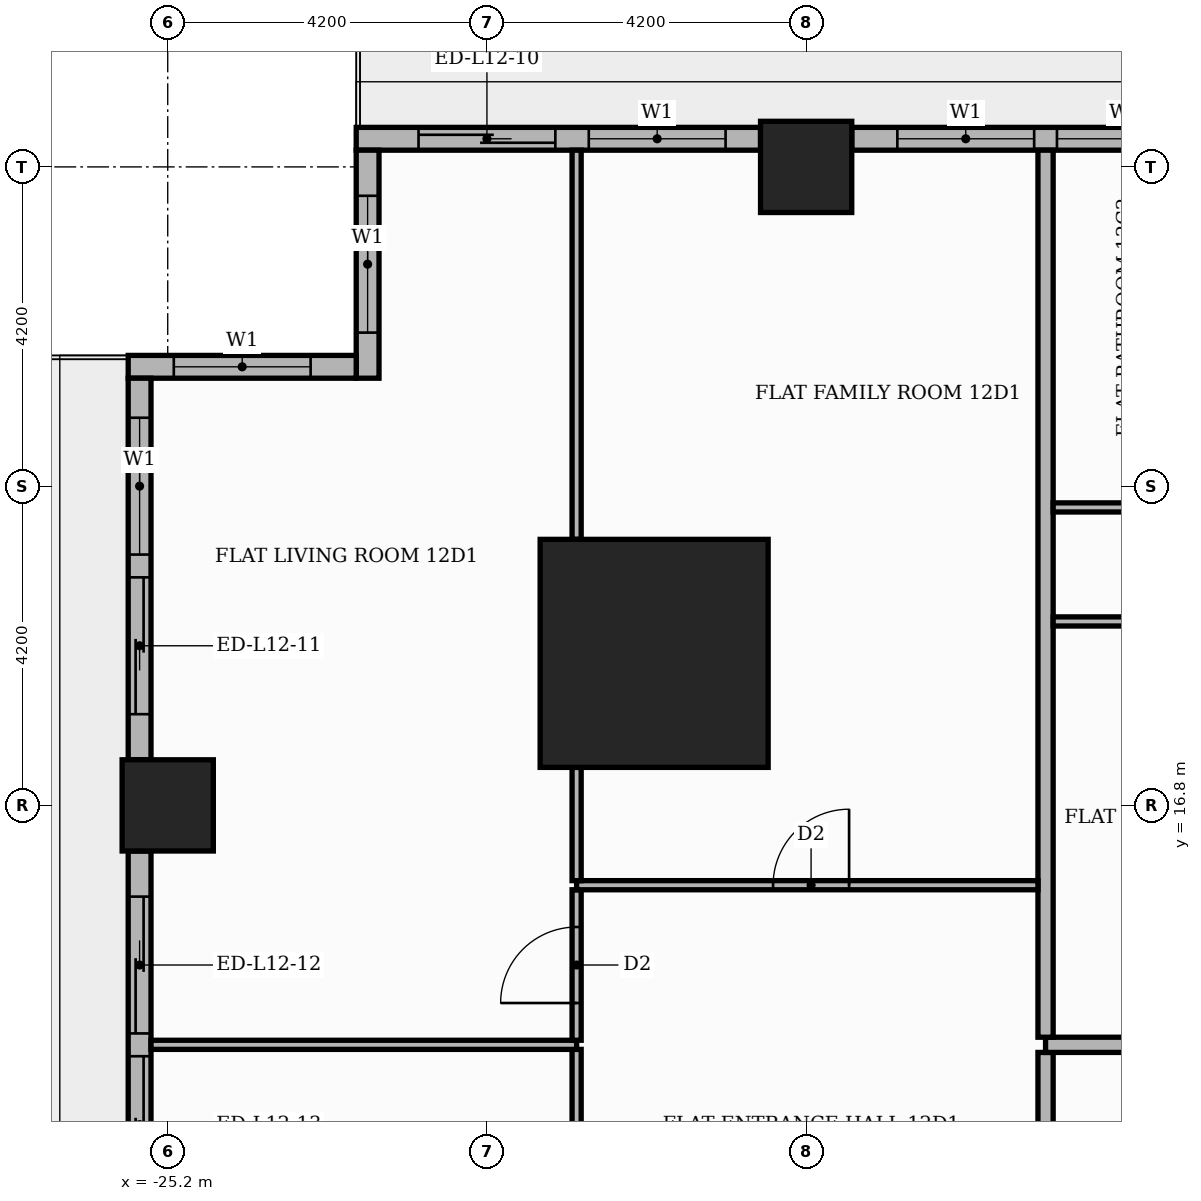
"""IFC4 building model, lengths in metres.
Left out: names, types, materials, properties, quantities, classifications, styles, units other than length and angle.
Written with IfcOpenShell. Run it as: python <this file> out.ifc"""

import sys

from ifc_helpers import new_model, si_unit, direction, frame, frame_2d, origin, origin_2d, place, context, subcontext, project, spatial, rectangle, extrude, element, fill, save


model = new_model("IFC4")
c1 = context("Model", 3, precision=1e-05, world=origin(), true_north=direction((0.0, 1.0)))
c2 = subcontext(c1, "Body", "Model", "MODEL_VIEW")
j1 = project(units=[si_unit("LENGTHUNIT", "METRE"), si_unit("PLANEANGLEUNIT", "RADIAN")], contexts=[c1])
p1 = place(None, origin())
s1 = spatial("IfcSite", under=j1, at=p1, CompositionType="ELEMENT")
p2 = place(p1, origin())
s2 = spatial("IfcBuilding", under=s1, at=p2, CompositionType="ELEMENT")
p3 = place(p2, frame((0.0, 0.0, 54.3)))
s3 = spatial("IfcBuildingStorey", under=s2, at=p3, CompositionType="ELEMENT", Elevation=54.3)
p4 = place(p3, frame((-18.8, 18.8, 0.0), z_axis=(0.0, 0.0, 1.0), x_axis=(1.0, 0.0, 0.0)))
e1 = element("IfcColumn", 1, at=p4, inside=s3, PredefinedType="COLUMN", context=c2, shape_type="SweptSolid", body=[
    extrude(rectangle(XDim=3.0, YDim=3.0, at=origin_2d()), origin(), (0.0, 0.0, 1.0), 3.9),
])
for number, where, z_axis, x_axis in (
    (2, (-16.8, 25.2, 0.0), (0.0, 0.0, 1.0), (1.0, 0.0, 0.0)),
    (3, (-25.2, 16.8, 0.0), (0.0, 0.0, 1.0), (1.0, 0.0, 0.0)),
):
    element("IfcColumn", number, at=place(p3, frame(where, z_axis=z_axis, x_axis=x_axis)), inside=s3, PredefinedType="COLUMN", context=c2, shape_type="SweptSolid", body=[
        extrude(rectangle(XDim=1.2, YDim=1.2, at=origin_2d()), origin(), (0.0, 0.0, 1.0), 3.9),
    ])
p5 = place(p3, frame((-9.0, 25.57, 0.0), z_axis=(0.0, 0.0, 1.0), x_axis=(-1.0, 0.0, 0.0)))
e4 = element("IfcWall", 4, at=p5, inside=s3, PredefinedType="STANDARD", context=c2, shape_type="SweptSolid", body=[
    extrude(rectangle(XDim=7.2, YDim=0.3, at=frame_2d((3.6, 0.0))), origin(), (0.0, 0.0, 1.0), 3.48),
])
p6 = place(p5, frame((0.6, 0.0, 0.9)))
e5 = element("IfcOpeningElement", 5, at=p6, cuts=e4, PredefinedType="OPENING", context=c2, shape_type="SweptSolid", body=[
    extrude(rectangle(XDim=1.8, YDim=2.1, at=frame_2d((0.9, 1.05))), frame((0.0, 0.16, 0.0), z_axis=(0.0, -1.0, 0.0), x_axis=(1.0, 0.0, 0.0)), (0.0, 0.0, 1.0), 0.32),
])
p7 = place(p5, frame((2.7, 0.0, 0.9)))
e6 = element("IfcOpeningElement", 6, at=p7, cuts=e4, PredefinedType="OPENING", context=c2, shape_type="SweptSolid", body=[
    extrude(rectangle(XDim=1.8, YDim=2.1, at=frame_2d((0.9, 1.05))), frame((0.0, 0.16, 0.0), z_axis=(0.0, -1.0, 0.0), x_axis=(1.0, 0.0, 0.0)), (0.0, 0.0, 1.0), 0.32),
])
p8 = place(p5, frame((4.8, 0.0, 0.9)))
e7 = element("IfcOpeningElement", 7, at=p8, cuts=e4, PredefinedType="OPENING", context=c2, shape_type="SweptSolid", body=[
    extrude(rectangle(XDim=1.8, YDim=2.1, at=frame_2d((0.9, 1.05))), frame((0.0, 0.16, 0.0), z_axis=(0.0, -1.0, 0.0), x_axis=(1.0, 0.0, 0.0)), (0.0, 0.0, 1.0), 0.32),
])
p9 = place(p3, frame((-17.4, 25.57, 0.0), z_axis=(0.0, 0.0, 1.0), x_axis=(-1.0, 0.0, 0.0)))
e8 = element("IfcWall", 8, at=p9, inside=s3, PredefinedType="STANDARD", context=c2, shape_type="SweptSolid", body=[
    extrude(rectangle(XDim=5.32, YDim=0.3, at=frame_2d((2.66, 0.0))), origin(), (0.0, 0.0, 1.0), 3.48),
])
p10 = place(p9, frame((2.7, 0.0, 0.0)))
e9 = element("IfcOpeningElement", 9, at=p10, cuts=e8, PredefinedType="OPENING", context=c2, shape_type="SweptSolid", body=[
    extrude(rectangle(XDim=1.8, YDim=2.4, at=frame_2d((0.9, 1.2))), frame((0.0, 0.16, 0.0), z_axis=(0.0, -1.0, 0.0), x_axis=(1.0, 0.0, 0.0)), (0.0, 0.0, 1.0), 0.32),
])
p11 = place(p9, frame((0.46, 0.0, 0.9)))
e10 = element("IfcOpeningElement", 10, at=p11, cuts=e8, PredefinedType="OPENING", context=c2, shape_type="SweptSolid", body=[
    extrude(rectangle(XDim=1.8, YDim=2.1, at=frame_2d((0.9, 1.05))), frame((0.0, 0.16, 0.0), z_axis=(0.0, -1.0, 0.0), x_axis=(1.0, 0.0, 0.0)), (0.0, 0.0, 1.0), 0.32),
])
p12 = place(p3, frame((-22.57, 25.42, 0.0), z_axis=(0.0, 0.0, 1.0), x_axis=(0.0, -1.0, 0.0)))
e11 = element("IfcWall", 11, at=p12, inside=s3, PredefinedType="STANDARD", context=c2, shape_type="SweptSolid", body=[
    extrude(rectangle(XDim=3.0, YDim=0.3, at=frame_2d((1.5, 0.0))), origin(), (0.0, 0.0, 1.0), 3.48),
])
p13 = place(p12, frame((0.6, 0.0, 0.9)))
e12 = element("IfcOpeningElement", 12, at=p13, cuts=e11, PredefinedType="OPENING", context=c2, shape_type="SweptSolid", body=[
    extrude(rectangle(XDim=1.8, YDim=2.1, at=frame_2d((0.9, 1.05))), frame((0.0, 0.16, 0.0), z_axis=(0.0, -1.0, 0.0), x_axis=(1.0, 0.0, 0.0)), (0.0, 0.0, 1.0), 0.32),
])
p14 = place(p3, frame((-22.72, 22.57, 0.0), z_axis=(0.0, 0.0, 1.0), x_axis=(-1.0, 0.0, 0.0)))
e13 = element("IfcWall", 13, at=p14, inside=s3, PredefinedType="STANDARD", context=c2, shape_type="SweptSolid", body=[
    extrude(rectangle(XDim=3.0, YDim=0.3, at=frame_2d((1.5, 0.0))), origin(), (0.0, 0.0, 1.0), 3.48),
])
p15 = place(p14, frame((0.6, 0.0, 0.9)))
e14 = element("IfcOpeningElement", 14, at=p15, cuts=e13, PredefinedType="OPENING", context=c2, shape_type="SweptSolid", body=[
    extrude(rectangle(XDim=1.8, YDim=2.1, at=frame_2d((0.9, 1.05))), frame((0.0, 0.16, 0.0), z_axis=(0.0, -1.0, 0.0), x_axis=(1.0, 0.0, 0.0)), (0.0, 0.0, 1.0), 0.32),
])
p16 = place(p3, frame((-25.57, 22.42, 0.0), z_axis=(0.0, 0.0, 1.0), x_axis=(0.0, -1.0, 0.0)))
e15 = element("IfcWall", 15, at=p16, inside=s3, PredefinedType="STANDARD", context=c2, shape_type="SweptSolid", body=[
    extrude(rectangle(XDim=5.02, YDim=0.3, at=frame_2d((2.51, 0.0))), origin(), (0.0, 0.0, 1.0), 3.48),
])
p17 = place(p16, frame((0.52, 0.0, 0.9)))
e16 = element("IfcOpeningElement", 16, at=p17, cuts=e15, PredefinedType="OPENING", context=c2, shape_type="SweptSolid", body=[
    extrude(rectangle(XDim=1.8, YDim=2.1, at=frame_2d((0.9, 1.05))), frame((0.0, 0.16, 0.0), z_axis=(0.0, -1.0, 0.0), x_axis=(1.0, 0.0, 0.0)), (0.0, 0.0, 1.0), 0.32),
])
p18 = place(p16, frame((2.62, 0.0, 0.0)))
e17 = element("IfcOpeningElement", 17, at=p18, cuts=e15, PredefinedType="OPENING", context=c2, shape_type="SweptSolid", body=[
    extrude(rectangle(XDim=1.8, YDim=2.4, at=frame_2d((0.9, 1.2))), frame((0.0, 0.16, 0.0), z_axis=(0.0, -1.0, 0.0), x_axis=(1.0, 0.0, 0.0)), (0.0, 0.0, 1.0), 0.32),
])
p19 = place(p3, frame((-25.57, 16.2, 0.0), z_axis=(0.0, 0.0, 1.0), x_axis=(0.0, -1.0, 0.0)))
e18 = element("IfcWall", 18, at=p19, inside=s3, PredefinedType="STANDARD", context=c2, shape_type="SweptSolid", body=[
    extrude(rectangle(XDim=7.2, YDim=0.3, at=frame_2d((3.6, 0.0))), origin(), (0.0, 0.0, 1.0), 3.48),
])
p20 = place(p19, frame((0.6, 0.0, 0.0)))
e19 = element("IfcOpeningElement", 19, at=p20, cuts=e18, PredefinedType="OPENING", context=c2, shape_type="SweptSolid", body=[
    extrude(rectangle(XDim=1.8, YDim=2.4, at=frame_2d((0.9, 1.2))), frame((0.0, 0.16, 0.0), z_axis=(0.0, -1.0, 0.0), x_axis=(1.0, 0.0, 0.0)), (0.0, 0.0, 1.0), 0.32),
])
p21 = place(p19, frame((2.7, 0.0, 0.0)))
e20 = element("IfcOpeningElement", 20, at=p21, cuts=e18, PredefinedType="OPENING", context=c2, shape_type="SweptSolid", body=[
    extrude(rectangle(XDim=1.8, YDim=2.4, at=frame_2d((0.9, 1.2))), frame((0.0, 0.16, 0.0), z_axis=(0.0, -1.0, 0.0), x_axis=(1.0, 0.0, 0.0)), (0.0, 0.0, 1.0), 0.32),
])
p22 = place(p19, frame((4.8, 0.0, 0.9)))
e21 = element("IfcOpeningElement", 21, at=p22, cuts=e18, PredefinedType="OPENING", context=c2, shape_type="SweptSolid", body=[
    extrude(rectangle(XDim=1.8, YDim=2.1, at=frame_2d((0.9, 1.05))), frame((0.0, 0.16, 0.0), z_axis=(0.0, -1.0, 0.0), x_axis=(1.0, 0.0, 0.0)), (0.0, 0.0, 1.0), 0.32),
])
p23 = place(p3, frame((-13.65, 5.35, 0.0), z_axis=(0.0, 0.0, 1.0), x_axis=(0.0, 1.0, 0.0)))
e22 = element("IfcWall", 22, at=p23, inside=s3, PredefinedType="PARTITIONING", context=c2, shape_type="SweptSolid", body=[
    extrude(rectangle(XDim=8.2, YDim=0.2, at=frame_2d((4.1, 0.0))), origin(), (0.0, 0.0, 1.0), 3.48),
])
p24 = place(p23, frame((5.65, 0.0, 0.0)))
e23 = element("IfcOpeningElement", 23, at=p24, cuts=e22, PredefinedType="OPENING", context=c2, shape_type="SweptSolid", body=[
    extrude(rectangle(XDim=1.1, YDim=2.4, at=frame_2d((0.55, 1.2))), frame((0.0, 0.11, 0.0), z_axis=(0.0, -1.0, 0.0), x_axis=(1.0, 0.0, 0.0)), (0.0, 0.0, 1.0), 0.22),
])
p25 = place(p3, frame((-19.82, 9.51, 0.0), z_axis=(0.0, 0.0, 1.0), x_axis=(0.0, 1.0, 0.0)))
e24 = element("IfcWall", 24, at=p25, inside=s3, PredefinedType="PARTITIONING", context=c2, shape_type="SweptSolid", body=[
    extrude(rectangle(XDim=4.08, YDim=0.12, at=frame_2d((2.04, 0.0))), origin(), (0.0, 0.0, 1.0), 3.48),
])
p26 = place(p25, frame((1.59, 0.0, 0.0)))
e25 = element("IfcOpeningElement", 25, at=p26, cuts=e24, PredefinedType="OPENING", context=c2, shape_type="SweptSolid", body=[
    extrude(rectangle(XDim=0.9, YDim=2.1, at=frame_2d((0.45, 1.05))), frame((0.0, 0.07, 0.0), z_axis=(0.0, -1.0, 0.0), x_axis=(1.0, 0.0, 0.0)), (0.0, 0.0, 1.0), 0.14),
])
p27 = place(p3, frame((-25.42, 13.65, 0.0), z_axis=(0.0, 0.0, 1.0), x_axis=(1.0, 0.0, 0.0)))
e26 = element("IfcWall", 26, at=p27, inside=s3, PredefinedType="PARTITIONING", context=c2, shape_type="SweptSolid", body=[
    extrude(rectangle(XDim=5.6, YDim=0.12, at=frame_2d((2.8, 0.0))), origin(), (0.0, 0.0, 1.0), 3.48),
])
p28 = place(p3, frame((-13.65, 13.65, 0.0), z_axis=(0.0, 0.0, 1.0), x_axis=(1.0, 0.0, 0.0)))
e27 = element("IfcWall", 27, at=p28, inside=s3, PredefinedType="PARTITIONING", context=c2, shape_type="SweptSolid", body=[
    extrude(rectangle(XDim=39.07, YDim=0.2, at=frame_2d((19.535, 0.0))), origin(), (0.0, 0.0, 1.0), 3.48),
])
p29 = place(p28, frame((24.65, 0.0, 0.0)))
e28 = element("IfcOpeningElement", 28, at=p29, cuts=e27, PredefinedType="OPENING", context=c2, shape_type="SweptSolid", body=[
    extrude(rectangle(XDim=1.1, YDim=2.4, at=frame_2d((0.55, 1.2))), frame((0.0, 0.11, 0.0), z_axis=(0.0, -1.0, 0.0), x_axis=(1.0, 0.0, 0.0)), (0.0, 0.0, 1.0), 0.22),
])
p30 = place(p28, frame((14.15, 0.0, 0.0)))
e29 = element("IfcOpeningElement", 29, at=p30, cuts=e27, PredefinedType="OPENING", context=c2, shape_type="SweptSolid", body=[
    extrude(rectangle(XDim=1.1, YDim=2.4, at=frame_2d((0.55, 1.2))), frame((0.0, 0.11, 0.0), z_axis=(0.0, -1.0, 0.0), x_axis=(1.0, 0.0, 0.0)), (0.0, 0.0, 1.0), 0.22),
])
p31 = place(p3, frame((-19.82, 13.71, 0.0), z_axis=(0.0, 0.0, 1.0), x_axis=(0.0, 1.0, 0.0)))
e30 = element("IfcWall", 30, at=p31, inside=s3, PredefinedType="PARTITIONING", context=c2, shape_type="SweptSolid", body=[
    extrude(rectangle(XDim=1.98, YDim=0.12, at=frame_2d((0.99, 0.0))), origin(), (0.0, 0.0, 1.0), 3.48),
])
p32 = place(p31, frame((0.49, 0.0, 0.0)))
e31 = element("IfcOpeningElement", 31, at=p32, cuts=e30, PredefinedType="OPENING", context=c2, shape_type="SweptSolid", body=[
    extrude(rectangle(XDim=1.0, YDim=2.1, at=frame_2d((0.5, 1.05))), frame((0.0, 0.07, 0.0), z_axis=(0.0, -1.0, 0.0), x_axis=(1.0, 0.0, 0.0)), (0.0, 0.0, 1.0), 0.14),
])
p33 = place(p3, frame((-13.65, 13.75, 0.0), z_axis=(0.0, 0.0, 1.0), x_axis=(0.0, 1.0, 0.0)))
e32 = element("IfcWall", 32, at=p33, inside=s3, PredefinedType="PARTITIONING", context=c2, shape_type="SweptSolid", body=[
    extrude(rectangle(XDim=11.67, YDim=0.2, at=frame_2d((5.835, 0.0))), origin(), (0.0, 0.0, 1.0), 3.48),
])
p34 = place(p3, frame((-19.82, 15.75, 0.0), z_axis=(0.0, 0.0, 1.0), x_axis=(1.0, 0.0, 0.0)))
e33 = element("IfcWall", 33, at=p34, inside=s3, PredefinedType="PARTITIONING", context=c2, shape_type="SweptSolid", body=[
    extrude(rectangle(XDim=6.07, YDim=0.12, at=frame_2d((3.035, 0.0))), origin(), (0.0, 0.0, 1.0), 3.48),
])
p35 = place(p34, frame((2.585, 0.0, 0.0)))
e34 = element("IfcOpeningElement", 34, at=p35, cuts=e33, PredefinedType="OPENING", context=c2, shape_type="SweptSolid", body=[
    extrude(rectangle(XDim=1.0, YDim=2.1, at=frame_2d((0.5, 1.05))), frame((0.0, 0.07, 0.0), z_axis=(0.0, -1.0, 0.0), x_axis=(1.0, 0.0, 0.0)), (0.0, 0.0, 1.0), 0.14),
])
p36 = place(p3, frame((-19.82, 15.81, 0.0), z_axis=(0.0, 0.0, 1.0), x_axis=(0.0, 1.0, 0.0)))
e35 = element("IfcWall", 35, at=p36, inside=s3, PredefinedType="PARTITIONING", context=c2, shape_type="SweptSolid", body=[
    extrude(rectangle(XDim=1.49, YDim=0.12, at=frame_2d((0.745, 0.0))), origin(), (0.0, 0.0, 1.0), 3.48),
])
p37 = place(p3, frame((-13.55, 19.22, 0.0), z_axis=(0.0, 0.0, 1.0), x_axis=(1.0, 0.0, 0.0)))
e36 = element("IfcWall", 36, at=p37, inside=s3, PredefinedType="PARTITIONING", context=c2, shape_type="SweptSolid", body=[
    extrude(rectangle(XDim=12.5, YDim=0.12, at=frame_2d((6.25, 0.0))), origin(), (0.0, 0.0, 1.0), 3.48),
])
p38 = place(p37, frame((8.9, 0.0, 0.0)))
e37 = element("IfcOpeningElement", 37, at=p38, cuts=e36, PredefinedType="OPENING", context=c2, shape_type="SweptSolid", body=[
    extrude(rectangle(XDim=0.9, YDim=2.1, at=frame_2d((0.45, 1.05))), frame((0.0, 0.07, 0.0), z_axis=(0.0, -1.0, 0.0), x_axis=(1.0, 0.0, 0.0)), (0.0, 0.0, 1.0), 0.14),
])
p39 = place(p37, frame((4.55, 0.0, 0.0)))
e38 = element("IfcOpeningElement", 38, at=p39, cuts=e36, PredefinedType="OPENING", context=c2, shape_type="SweptSolid", body=[
    extrude(rectangle(XDim=0.9, YDim=2.1, at=frame_2d((0.45, 1.05))), frame((0.0, 0.07, 0.0), z_axis=(0.0, -1.0, 0.0), x_axis=(1.0, 0.0, 0.0)), (0.0, 0.0, 1.0), 0.14),
])
p40 = place(p37, frame((1.4, 0.0, 0.0)))
e39 = element("IfcOpeningElement", 39, at=p40, cuts=e36, PredefinedType="OPENING", context=c2, shape_type="SweptSolid", body=[
    extrude(rectangle(XDim=0.9, YDim=2.1, at=frame_2d((0.45, 1.05))), frame((0.0, 0.07, 0.0), z_axis=(0.0, -1.0, 0.0), x_axis=(1.0, 0.0, 0.0)), (0.0, 0.0, 1.0), 0.14),
])
p41 = place(p3, frame((-19.82, 20.3, 0.0), z_axis=(0.0, 0.0, 1.0), x_axis=(0.0, 1.0, 0.0)))
e40 = element("IfcWall", 40, at=p41, inside=s3, PredefinedType="PARTITIONING", context=c2, shape_type="SweptSolid", body=[
    extrude(rectangle(XDim=5.12, YDim=0.12, at=frame_2d((2.56, 0.0))), origin(), (0.0, 0.0, 1.0), 3.48),
])
p42 = place(p3, frame((-13.55, 20.72, 0.0), z_axis=(0.0, 0.0, 1.0), x_axis=(1.0, 0.0, 0.0)))
e41 = element("IfcWall", 41, at=p42, inside=s3, PredefinedType="PARTITIONING", context=c2, shape_type="SweptSolid", body=[
    extrude(rectangle(XDim=18.7, YDim=0.12, at=frame_2d((9.35, 0.0))), origin(), (0.0, 0.0, 1.0), 3.48),
])
p43 = place(p42, frame((16.2, 0.0, 0.0)))
e42 = element("IfcOpeningElement", 42, at=p43, cuts=e41, PredefinedType="OPENING", context=c2, shape_type="SweptSolid", body=[
    extrude(rectangle(XDim=1.0, YDim=2.1, at=frame_2d((0.5, 1.05))), frame((0.0, 0.07, 0.0), z_axis=(0.0, -1.0, 0.0), x_axis=(1.0, 0.0, 0.0)), (0.0, 0.0, 1.0), 0.14),
])
p44 = place(p42, frame((12.05, 0.0, 0.0)))
e43 = element("IfcOpeningElement", 43, at=p44, cuts=e41, PredefinedType="OPENING", context=c2, shape_type="SweptSolid", body=[
    extrude(rectangle(XDim=0.9, YDim=2.1, at=frame_2d((0.45, 1.05))), frame((0.0, 0.07, 0.0), z_axis=(0.0, -1.0, 0.0), x_axis=(1.0, 0.0, 0.0)), (0.0, 0.0, 1.0), 0.14),
])
p45 = place(p42, frame((3.65, 0.0, 0.0)))
e44 = element("IfcOpeningElement", 44, at=p45, cuts=e41, PredefinedType="OPENING", context=c2, shape_type="SweptSolid", body=[
    extrude(rectangle(XDim=0.9, YDim=2.1, at=frame_2d((0.45, 1.05))), frame((0.0, 0.07, 0.0), z_axis=(0.0, -1.0, 0.0), x_axis=(1.0, 0.0, 0.0)), (0.0, 0.0, 1.0), 0.14),
])
p46 = place(p7, origin())
e45 = element("IfcWindow", 45, at=p46, inside=s3, PartitioningType="SINGLE_PANEL", PredefinedType="WINDOW", context=c2, shape_type="SweptSolid", body=[
    extrude(rectangle(XDim=1.8, YDim=2.1, at=frame_2d((0.9, 1.05))), frame((0.0, 0.03, 0.0), z_axis=(0.0, -1.0, 0.0), x_axis=(1.0, 0.0, 0.0)), (0.0, 0.0, 1.0), 0.06),
])
fill(e6, e45)
p47 = place(p8, origin())
e46 = element("IfcWindow", 46, at=p47, inside=s3, PartitioningType="SINGLE_PANEL", PredefinedType="WINDOW", context=c2, shape_type="SweptSolid", body=[
    extrude(rectangle(XDim=1.8, YDim=2.1, at=frame_2d((0.9, 1.05))), frame((0.0, 0.03, 0.0), z_axis=(0.0, -1.0, 0.0), x_axis=(1.0, 0.0, 0.0)), (0.0, 0.0, 1.0), 0.06),
])
fill(e7, e46)
p48 = place(p10, origin())
e47 = element("IfcDoor", 47, at=p48, inside=s3, OperationType="SLIDING_TO_LEFT", PredefinedType="DOOR", context=c2, shape_type="SweptSolid", body=[
    extrude(rectangle(XDim=1.8, YDim=2.4, at=frame_2d((0.9, 1.2))), frame((0.0, 0.025, 0.0), z_axis=(0.0, -1.0, 0.0), x_axis=(1.0, 0.0, 0.0)), (0.0, 0.0, 1.0), 0.05),
])
fill(e9, e47)
p49 = place(p11, origin())
e48 = element("IfcWindow", 48, at=p49, inside=s3, PartitioningType="SINGLE_PANEL", PredefinedType="WINDOW", context=c2, shape_type="SweptSolid", body=[
    extrude(rectangle(XDim=1.8, YDim=2.1, at=frame_2d((0.9, 1.05))), frame((0.0, 0.03, 0.0), z_axis=(0.0, -1.0, 0.0), x_axis=(1.0, 0.0, 0.0)), (0.0, 0.0, 1.0), 0.06),
])
fill(e10, e48)
p50 = place(p13, origin())
e49 = element("IfcWindow", 49, at=p50, inside=s3, PartitioningType="SINGLE_PANEL", PredefinedType="WINDOW", context=c2, shape_type="SweptSolid", body=[
    extrude(rectangle(XDim=1.8, YDim=2.1, at=frame_2d((0.9, 1.05))), frame((0.0, 0.03, 0.0), z_axis=(0.0, -1.0, 0.0), x_axis=(1.0, 0.0, 0.0)), (0.0, 0.0, 1.0), 0.06),
])
fill(e12, e49)
p51 = place(p15, origin())
e50 = element("IfcWindow", 50, at=p51, inside=s3, PartitioningType="SINGLE_PANEL", PredefinedType="WINDOW", context=c2, shape_type="SweptSolid", body=[
    extrude(rectangle(XDim=1.8, YDim=2.1, at=frame_2d((0.9, 1.05))), frame((0.0, 0.03, 0.0), z_axis=(0.0, -1.0, 0.0), x_axis=(1.0, 0.0, 0.0)), (0.0, 0.0, 1.0), 0.06),
])
fill(e14, e50)
p52 = place(p17, origin())
e51 = element("IfcWindow", 51, at=p52, inside=s3, PartitioningType="SINGLE_PANEL", PredefinedType="WINDOW", context=c2, shape_type="SweptSolid", body=[
    extrude(rectangle(XDim=1.8, YDim=2.1, at=frame_2d((0.9, 1.05))), frame((0.0, 0.03, 0.0), z_axis=(0.0, -1.0, 0.0), x_axis=(1.0, 0.0, 0.0)), (0.0, 0.0, 1.0), 0.06),
])
fill(e16, e51)
p53 = place(p18, origin())
e52 = element("IfcDoor", 52, at=p53, inside=s3, OperationType="SLIDING_TO_RIGHT", PredefinedType="DOOR", context=c2, shape_type="SweptSolid", body=[
    extrude(rectangle(XDim=1.8, YDim=2.4, at=frame_2d((0.9, 1.2))), frame((0.0, 0.025, 0.0), z_axis=(0.0, -1.0, 0.0), x_axis=(1.0, 0.0, 0.0)), (0.0, 0.0, 1.0), 0.05),
])
fill(e17, e52)
p54 = place(p20, origin())
e53 = element("IfcDoor", 53, at=p54, inside=s3, OperationType="SLIDING_TO_LEFT", PredefinedType="DOOR", context=c2, shape_type="SweptSolid", body=[
    extrude(rectangle(XDim=1.8, YDim=2.4, at=frame_2d((0.9, 1.2))), frame((0.0, 0.025, 0.0), z_axis=(0.0, -1.0, 0.0), x_axis=(1.0, 0.0, 0.0)), (0.0, 0.0, 1.0), 0.05),
])
fill(e19, e53)
p55 = place(p21, origin())
e54 = element("IfcDoor", 54, at=p55, inside=s3, OperationType="SLIDING_TO_RIGHT", PredefinedType="DOOR", context=c2, shape_type="SweptSolid", body=[
    extrude(rectangle(XDim=1.8, YDim=2.4, at=frame_2d((0.9, 1.2))), frame((0.0, 0.025, 0.0), z_axis=(0.0, -1.0, 0.0), x_axis=(1.0, 0.0, 0.0)), (0.0, 0.0, 1.0), 0.05),
])
fill(e20, e54)
p56 = place(p35, origin())
e55 = element("IfcDoor", 55, at=p56, inside=s3, OperationType="SINGLE_SWING_RIGHT", PredefinedType="DOOR", context=c2, shape_type="SweptSolid", body=[
    extrude(rectangle(XDim=1.0, YDim=2.1, at=frame_2d((0.5, 1.05))), frame((0.0, 0.025, 0.0), z_axis=(0.0, -1.0, 0.0), x_axis=(1.0, 0.0, 0.0)), (0.0, 0.0, 1.0), 0.05),
])
fill(e34, e55)
p57 = place(p32, origin())
e56 = element("IfcDoor", 56, at=p57, inside=s3, OperationType="SINGLE_SWING_LEFT", PredefinedType="DOOR", context=c2, shape_type="SweptSolid", body=[
    extrude(rectangle(XDim=1.0, YDim=2.1, at=frame_2d((0.5, 1.05))), frame((0.0, 0.025, 0.0), z_axis=(0.0, -1.0, 0.0), x_axis=(1.0, 0.0, 0.0)), (0.0, 0.0, 1.0), 0.05),
])
fill(e31, e56)
save(model, sys.argv[1])
